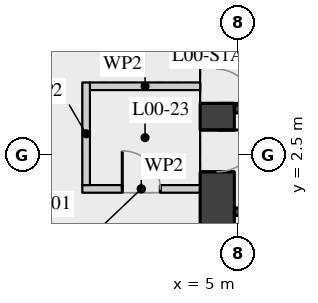
"""IFC4 building model, lengths in metres.
Left out: names, types, materials, properties, quantities, classifications, styles, units other than length and angle.
Written with IfcOpenShell. Run it as: python <this file> out.ifc"""

import sys

from ifc_helpers import new_model, si_unit, direction, frame, frame_2d, origin, place, context, subcontext, project, spatial, rectangle, extrude, element, fill, save


model = new_model("IFC4")
c1 = context("Model", 3, precision=1e-05, world=origin(), true_north=direction((0.0, 1.0)))
c2 = subcontext(c1, "Body", "Model", "MODEL_VIEW")
j1 = project(units=[si_unit("LENGTHUNIT", "METRE"), si_unit("PLANEANGLEUNIT", "RADIAN")], contexts=[c1])
p1 = place(None, origin())
s1 = spatial("IfcSite", under=j1, at=p1, CompositionType="ELEMENT")
p2 = place(p1, origin())
s2 = spatial("IfcBuilding", under=s1, at=p2, CompositionType="ELEMENT")
p3 = place(p2, origin())
s3 = spatial("IfcBuildingStorey", under=s2, at=p3, CompositionType="ELEMENT", Elevation=0.0)
p4 = place(p3, frame((4.45, -11.1, 0.0), z_axis=(0.0, 0.0, 1.0), x_axis=(0.0, 1.0, 0.0)))
e1 = element("IfcWall", 1, at=p4, inside=s3, PredefinedType="SHEAR", context=c2, shape_type="SweptSolid", body=[
    extrude(rectangle(XDim=22.2, YDim=0.9, at=frame_2d((11.1, 0.0))), origin(), (0.0, 0.0, 1.0), 7.09),
])
p5 = place(p4, frame((2.35, 0.0, 0.0)))
e2 = element("IfcOpeningElement", 2, at=p5, cuts=e1, PredefinedType="OPENING", context=c2, shape_type="SweptSolid", body=[
    extrude(rectangle(XDim=1.5, YDim=2.1, at=frame_2d((0.75, 1.05))), frame((0.0, 0.46, 0.0), z_axis=(0.0, -1.0, 0.0), x_axis=(1.0, 0.0, 0.0)), (0.0, 0.0, 1.0), 0.92),
])
p6 = place(p4, frame((5.45, 0.0, 0.0)))
e3 = element("IfcOpeningElement", 3, at=p6, cuts=e1, PredefinedType="OPENING", context=c2, shape_type="SweptSolid", body=[
    extrude(rectangle(XDim=1.8, YDim=2.1, at=frame_2d((0.9, 1.05))), frame((0.0, 0.46, 0.0), z_axis=(0.0, -1.0, 0.0), x_axis=(1.0, 0.0, 0.0)), (0.0, 0.0, 1.0), 0.92),
])
p7 = place(p4, frame((7.95, 0.0, 0.0)))
e4 = element("IfcOpeningElement", 4, at=p7, cuts=e1, PredefinedType="OPENING", context=c2, shape_type="SweptSolid", body=[
    extrude(rectangle(XDim=1.1, YDim=2.1, at=frame_2d((0.55, 1.05))), frame((0.0, 0.46, 0.0), z_axis=(0.0, -1.0, 0.0), x_axis=(1.0, 0.0, 0.0)), (0.0, 0.0, 1.0), 0.92),
])
p8 = place(p4, frame((10.6, 0.0, 0.0)))
e5 = element("IfcOpeningElement", 5, at=p8, cuts=e1, PredefinedType="OPENING", context=c2, shape_type="SweptSolid", body=[
    extrude(rectangle(XDim=1.0, YDim=2.1, at=frame_2d((0.5, 1.05))), frame((0.0, 0.46, 0.0), z_axis=(0.0, -1.0, 0.0), x_axis=(1.0, 0.0, 0.0)), (0.0, 0.0, 1.0), 0.92),
])
p9 = place(p4, frame((13.15, 0.0, 0.0)))
e6 = element("IfcOpeningElement", 6, at=p9, cuts=e1, PredefinedType="OPENING", context=c2, shape_type="SweptSolid", body=[
    extrude(rectangle(XDim=1.1, YDim=2.1, at=frame_2d((0.55, 1.05))), frame((0.0, 0.46, 0.0), z_axis=(0.0, -1.0, 0.0), x_axis=(1.0, 0.0, 0.0)), (0.0, 0.0, 1.0), 0.92),
])
p10 = place(p4, frame((14.95, 0.0, 0.0)))
e7 = element("IfcOpeningElement", 7, at=p10, cuts=e1, PredefinedType="OPENING", context=c2, shape_type="SweptSolid", body=[
    extrude(rectangle(XDim=1.8, YDim=2.1, at=frame_2d((0.9, 1.05))), frame((0.0, 0.46, 0.0), z_axis=(0.0, -1.0, 0.0), x_axis=(1.0, 0.0, 0.0)), (0.0, 0.0, 1.0), 0.92),
])
p11 = place(p4, frame((18.35, 0.0, 0.0)))
e8 = element("IfcOpeningElement", 8, at=p11, cuts=e1, PredefinedType="OPENING", context=c2, shape_type="SweptSolid", body=[
    extrude(rectangle(XDim=1.5, YDim=2.1, at=frame_2d((0.75, 1.05))), frame((0.0, 0.46, 0.0), z_axis=(0.0, -1.0, 0.0), x_axis=(1.0, 0.0, 0.0)), (0.0, 0.0, 1.0), 0.92),
])
p12 = place(p3, frame((4.9, 3.7, 0.0), z_axis=(0.0, 0.0, 1.0), x_axis=(1.0, 0.0, 0.0)))
e9 = element("IfcWall", 9, at=p12, inside=s3, PredefinedType="SHEAR", context=c2, shape_type="SweptSolid", body=[
    extrude(rectangle(XDim=10.2, YDim=0.2, at=frame_2d((5.1, 0.0))), origin(), (0.0, 0.0, 1.0), 7.09),
])
p13 = place(p12, frame((6.3, 0.0, 0.0)))
e10 = element("IfcOpeningElement", 10, at=p13, cuts=e9, PredefinedType="OPENING", context=c2, shape_type="SweptSolid", body=[
    extrude(rectangle(XDim=1.1, YDim=2.1, at=frame_2d((0.55, 1.05))), frame((0.0, 0.11, 0.0), z_axis=(0.0, -1.0, 0.0), x_axis=(1.0, 0.0, 0.0)), (0.0, 0.0, 1.0), 0.22),
])
p14 = place(p12, frame((8.6, 0.0, 0.0)))
e11 = element("IfcOpeningElement", 11, at=p14, cuts=e9, PredefinedType="OPENING", context=c2, shape_type="SweptSolid", body=[
    extrude(rectangle(XDim=1.1, YDim=2.1, at=frame_2d((0.55, 1.05))), frame((0.0, 0.11, 0.0), z_axis=(0.0, -1.0, 0.0), x_axis=(1.0, 0.0, 0.0)), (0.0, 0.0, 1.0), 0.22),
])
p15 = place(p3, frame((4.9, 1.0, 0.0), z_axis=(0.0, 0.0, 1.0), x_axis=(1.0, 0.0, 0.0)))
e12 = element("IfcWall", 12, at=p15, inside=s3, PredefinedType="SHEAR", context=c2, shape_type="SweptSolid", body=[
    extrude(rectangle(XDim=10.2, YDim=0.2, at=frame_2d((5.1, 0.0))), origin(), (0.0, 0.0, 1.0), 7.09),
])
p16 = place(p3, frame((0.9, 1.6, 0.0), z_axis=(0.0, 0.0, 1.0), x_axis=(1.0, 0.0, 0.0)))
e13 = element("IfcWall", 13, at=p16, inside=s3, PredefinedType="PARTITIONING", context=c2, shape_type="SweptSolid", body=[
    extrude(rectangle(XDim=3.102, YDim=0.2, at=frame_2d((1.551, 0.0))), origin(), (0.0, 0.0, 1.0), 7.09),
])
p17 = place(p16, frame((1.051, 0.0, 0.0)))
e14 = element("IfcOpeningElement", 14, at=p17, cuts=e13, PredefinedType="OPENING", context=c2, shape_type="SweptSolid", body=[
    extrude(rectangle(XDim=1.0, YDim=2.1, at=frame_2d((0.5, 1.05))), frame((0.0, 0.11, 0.0), z_axis=(0.0, -1.0, 0.0), x_axis=(1.0, 0.0, 0.0)), (0.0, 0.0, 1.0), 0.22),
])
p18 = place(p3, frame((1.1, 4.3, 0.0), z_axis=(0.0, 0.0, 1.0), x_axis=(1.0, 0.0, 0.0)))
e15 = element("IfcWall", 15, at=p18, inside=s3, PredefinedType="PARTITIONING", context=c2, shape_type="SweptSolid", body=[
    extrude(rectangle(XDim=2.902, YDim=0.2, at=frame_2d((1.451, 0.0))), origin(), (0.0, 0.0, 1.0), 7.09),
])
p19 = place(p3, frame((1.0, 1.7, 0.0), z_axis=(0.0, 0.0, 1.0), x_axis=(0.0, 1.0, 0.0)))
e16 = element("IfcWall", 16, at=p19, inside=s3, PredefinedType="PARTITIONING", context=c2, shape_type="SweptSolid", body=[
    extrude(rectangle(XDim=2.7, YDim=0.2, at=frame_2d((1.35, 0.0))), origin(), (0.0, 0.0, 1.0), 7.09),
])
p20 = place(p9, origin())
e17 = element("IfcDoor", 17, at=p20, inside=s3, OperationType="SINGLE_SWING_LEFT", PredefinedType="DOOR", context=c2, shape_type="SweptSolid", body=[
    extrude(rectangle(XDim=1.1, YDim=2.1, at=frame_2d((0.55, 1.05))), frame((0.0, 0.025, 0.0), z_axis=(0.0, -1.0, 0.0), x_axis=(1.0, 0.0, 0.0)), (0.0, 0.0, 1.0), 0.05),
])
fill(e6, e17)
p21 = place(p10, origin())
e18 = element("IfcDoor", 18, at=p21, inside=s3, OperationType="DOUBLE_DOOR_SINGLE_SWING", PredefinedType="DOOR", context=c2, shape_type="SweptSolid", body=[
    extrude(rectangle(XDim=1.8, YDim=2.1, at=frame_2d((0.9, 1.05))), frame((0.0, 0.025, 0.0), z_axis=(0.0, -1.0, 0.0), x_axis=(1.0, 0.0, 0.0)), (0.0, 0.0, 1.0), 0.05),
])
fill(e7, e18)
p22 = place(p17, origin())
e19 = element("IfcDoor", 19, at=p22, inside=s3, OperationType="SINGLE_SWING_LEFT", PredefinedType="DOOR", context=c2, shape_type="SweptSolid", body=[
    extrude(rectangle(XDim=1.0, YDim=2.1, at=frame_2d((0.5, 1.05))), frame((0.0, 0.025, 0.0), z_axis=(0.0, -1.0, 0.0), x_axis=(1.0, 0.0, 0.0)), (0.0, 0.0, 1.0), 0.05),
])
fill(e14, e19)
save(model, sys.argv[1])
